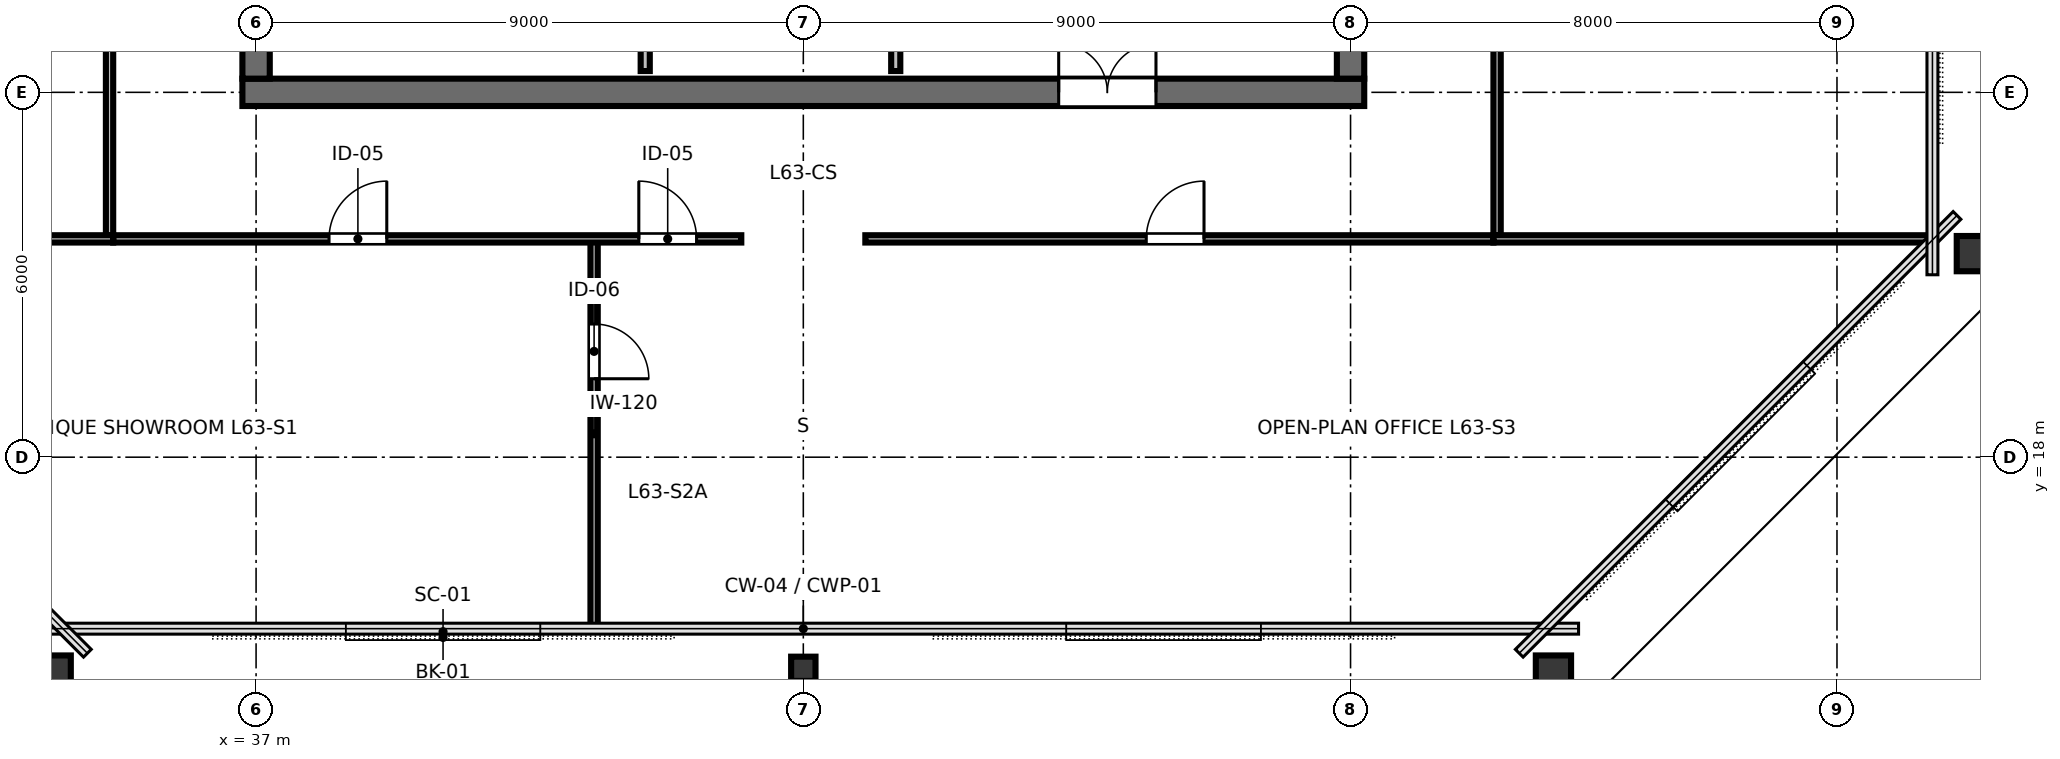
"""IFC4 building model, lengths in metres.
Left out: names, types, materials, properties, quantities, classifications, styles, units other than length and angle.
Written with IfcOpenShell. Run it as: python <this file> out.ifc"""

import sys

from ifc_helpers import new_model, si_unit, direction, frame, frame_2d, origin, origin_2d, place, context, subcontext, project, spatial, rectangle, hollow_rectangle, i_section, extrude, element, fill, save


model = new_model("IFC4")
c1 = context("Model", 3, precision=1e-05, world=origin(), true_north=direction((0.0, 1.0)))
c2 = subcontext(c1, "Body", "Model", "MODEL_VIEW")
j1 = project(units=[si_unit("LENGTHUNIT", "METRE"), si_unit("PLANEANGLEUNIT", "RADIAN")], contexts=[c1])
p1 = place(None, origin())
s1 = spatial("IfcSite", under=j1, at=p1, CompositionType="ELEMENT")
p2 = place(p1, origin())
s2 = spatial("IfcBuilding", under=s1, at=p2, CompositionType="ELEMENT")
p3 = place(p2, frame((0.0, 0.0, 239.4)))
s3 = spatial("IfcBuildingStorey", under=s2, at=p3, CompositionType="ELEMENT", Elevation=239.4)
p4 = place(p3, frame((36.775, 24.0, 0.0), z_axis=(0.0, 0.0, 1.0), x_axis=(1.0, 0.0, 0.0)))
e1 = element("IfcWall", 1, at=p4, inside=s3, PredefinedType="SHEAR", context=c2, shape_type="SweptSolid", body=[
    extrude(rectangle(XDim=18.45, YDim=0.45, at=frame_2d((9.225, 0.0))), origin(), (0.0, 0.0, 1.0), 3.36),
])
p5 = place(p4, frame((13.425, 0.0, 0.0)))
e2 = element("IfcOpeningElement", 2, at=p5, cuts=e1, PredefinedType="OPENING", context=c2, shape_type="SweptSolid", body=[
    extrude(rectangle(XDim=1.6, YDim=2.15, at=frame_2d((0.8, 1.075))), frame((0.0, 0.235, 0.0), z_axis=(0.0, -1.0, 0.0), x_axis=(1.0, 0.0, 0.0)), (0.0, 0.0, 1.0), 0.47),
])
p6 = place(p3, frame((37.0, 24.225, 0.0), z_axis=(0.0, 0.0, 1.0), x_axis=(0.0, 1.0, 0.0)))
e3 = element("IfcWall", 3, at=p6, inside=s3, PredefinedType="SHEAR", context=c2, shape_type="SweptSolid", body=[
    extrude(rectangle(XDim=15.55, YDim=0.45, at=frame_2d((7.775, 0.0))), origin(), (0.0, 0.0, 1.0), 3.36),
])
p7 = place(p6, frame((5.3, 0.0, 0.0)))
e4 = element("IfcOpeningElement", 4, at=p7, cuts=e3, PredefinedType="OPENING", context=c2, shape_type="SweptSolid", body=[
    extrude(rectangle(XDim=1.15, YDim=2.15, at=frame_2d((0.575, 1.075))), frame((0.0, 0.235, 0.0), z_axis=(0.0, -1.0, 0.0), x_axis=(1.0, 0.0, 0.0)), (0.0, 0.0, 1.0), 0.47),
])
p8 = place(p3, frame((55.0, 24.225, 0.0), z_axis=(0.0, 0.0, 1.0), x_axis=(0.0, 1.0, 0.0)))
e5 = element("IfcWall", 5, at=p8, inside=s3, PredefinedType="SHEAR", context=c2, shape_type="SweptSolid", body=[
    extrude(rectangle(XDim=15.55, YDim=0.45, at=frame_2d((7.775, 0.0))), origin(), (0.0, 0.0, 1.0), 3.36),
])
p9 = place(p8, frame((5.3, 0.0, 0.0)))
e6 = element("IfcOpeningElement", 6, at=p9, cuts=e5, PredefinedType="OPENING", context=c2, shape_type="SweptSolid", body=[
    extrude(rectangle(XDim=1.15, YDim=2.15, at=frame_2d((0.575, 1.075))), frame((0.0, 0.235, 0.0), z_axis=(0.0, -1.0, 0.0), x_axis=(1.0, 0.0, 0.0)), (0.0, 0.0, 1.0), 0.47),
])
p10 = place(p3, frame((33.663, 14.39, 0.0), z_axis=(0.0, 0.0, 1.0), x_axis=(1.0, 0.0, 0.0)))
e7 = element("IfcColumn", 7, at=p10, inside=s3, PredefinedType="COLUMN", context=c2, shape_type="SweptSolid", body=[
    extrude(hollow_rectangle(XDim=0.58, YDim=0.7, WallThickness=0.032, at=origin_2d()), origin(), (0.0, 0.0, 1.0), 3.373),
])
p11 = place(p3, frame((46.0, 14.52, 0.0), z_axis=(0.0, 0.0, 1.0), x_axis=(1.0, 0.0, 0.0)))
e8 = element("IfcColumn", 8, at=p11, inside=s3, PredefinedType="COLUMN", context=c2, shape_type="SweptSolid", body=[
    extrude(i_section(OverallWidth=0.401, OverallDepth=0.399, WebThickness=0.025, FlangeThickness=0.04, FilletRadius=0.025, at=origin_2d()), origin(), (0.0, 0.0, 1.0), 3.373),
])
for number, where, z_axis, x_axis in (
    (9, (58.337, 14.39, 0.0), (0.0, 0.0, 1.0), (1.0, 0.0, 0.0)),
    (10, (65.32, 21.348, 0.0), (0.0, 0.0, 1.0), (0.0, 1.0, 0.0)),
):
    element("IfcColumn", number, at=place(p3, frame(where, z_axis=z_axis, x_axis=x_axis)), inside=s3, PredefinedType="COLUMN", context=c2, shape_type="SweptSolid", body=[
        extrude(hollow_rectangle(XDim=0.58, YDim=0.7, WallThickness=0.032, at=origin_2d()), origin(), (0.0, 0.0, 1.0), 3.373),
    ])
p12 = place(p3, frame((43.4, 24.35, 0.0), z_axis=(0.0, 0.0, 1.0), x_axis=(0.0, 1.0, 0.0)))
e11 = element("IfcWall", 11, at=p12, inside=s3, PredefinedType="PARTITIONING", context=c2, shape_type="SweptSolid", body=[
    extrude(rectangle(XDim=3.9, YDim=0.15, at=frame_2d((1.95, 0.0))), origin(), (0.0, 0.0, 1.0), 3.375),
])
p13 = place(p12, frame((1.5, 0.0, 0.0)))
e12 = element("IfcOpeningElement", 12, at=p13, cuts=e11, PredefinedType="OPENING", context=c2, shape_type="SweptSolid", body=[
    extrude(rectangle(XDim=0.9, YDim=2.15, at=frame_2d((0.45, 1.075))), frame((0.0, 0.085, 0.0), z_axis=(0.0, -1.0, 0.0), x_axis=(1.0, 0.0, 0.0)), (0.0, 0.0, 1.0), 0.17),
])
p14 = place(p3, frame((47.52, 24.35, 0.0), z_axis=(0.0, 0.0, 1.0), x_axis=(0.0, 1.0, 0.0)))
e13 = element("IfcWall", 13, at=p14, inside=s3, PredefinedType="PARTITIONING", context=c2, shape_type="SweptSolid", body=[
    extrude(rectangle(XDim=3.9, YDim=0.15, at=frame_2d((1.95, 0.0))), origin(), (0.0, 0.0, 1.0), 3.375),
])
p15 = place(p14, frame((0.35, 0.0, 0.0)))
e14 = element("IfcOpeningElement", 14, at=p15, cuts=e13, PredefinedType="OPENING", context=c2, shape_type="SweptSolid", body=[
    extrude(rectangle(XDim=0.9, YDim=2.15, at=frame_2d((0.45, 1.075))), frame((0.0, 0.085, 0.0), z_axis=(0.0, -1.0, 0.0), x_axis=(1.0, 0.0, 0.0)), (0.0, 0.0, 1.0), 0.17),
])
p16 = place(p3, frame((42.559, 21.59, 0.0), z_axis=(0.0, 0.0, 1.0), x_axis=(0.0, -1.0, 0.0)))
e15 = element("IfcWall", 15, at=p16, inside=s3, PredefinedType="PARTITIONING", context=c2, shape_type="SweptSolid", body=[
    extrude(rectangle(XDim=6.41, YDim=0.12, at=frame_2d((3.205, 0.0))), origin(), (0.0, 0.0, 1.0), 2.655),
])
p17 = place(p16, frame((1.4, 0.0, 0.0)))
e16 = element("IfcOpeningElement", 16, at=p17, cuts=e15, PredefinedType="OPENING", context=c2, shape_type="SweptSolid", body=[
    extrude(rectangle(XDim=0.9, YDim=2.15, at=frame_2d((0.45, 1.075))), frame((0.0, 0.07, 0.0), z_axis=(0.0, -1.0, 0.0), x_axis=(1.0, 0.0, 0.0)), (0.0, 0.0, 1.0), 0.14),
])
p18 = place(p3, frame((34.65, 21.59, 0.0), z_axis=(0.0, 0.0, 1.0), x_axis=(1.0, 0.0, 0.0)))
e17 = element("IfcWall", 17, at=p18, inside=s3, PredefinedType="PARTITIONING", context=c2, shape_type="SweptSolid", body=[
    extrude(rectangle(XDim=10.33, YDim=0.12, at=frame_2d((5.165, 0.0))), origin(), (0.0, 0.0, 1.0), 2.655),
])
p19 = place(p18, frame((3.55, 0.0, 0.0)))
e18 = element("IfcOpeningElement", 18, at=p19, cuts=e17, PredefinedType="OPENING", context=c2, shape_type="SweptSolid", body=[
    extrude(rectangle(XDim=0.95, YDim=2.15, at=frame_2d((0.475, 1.075))), frame((0.0, 0.07, 0.0), z_axis=(0.0, -1.0, 0.0), x_axis=(1.0, 0.0, 0.0)), (0.0, 0.0, 1.0), 0.14),
])
p20 = place(p18, frame((8.645, 0.0, 0.0)))
e19 = element("IfcOpeningElement", 19, at=p20, cuts=e17, PredefinedType="OPENING", context=c2, shape_type="SweptSolid", body=[
    extrude(rectangle(XDim=0.95, YDim=2.15, at=frame_2d((0.475, 1.075))), frame((0.0, 0.07, 0.0), z_axis=(0.0, -1.0, 0.0), x_axis=(1.0, 0.0, 0.0)), (0.0, 0.0, 1.0), 0.14),
])
p21 = place(p3, frame((47.02, 21.59, 0.0), z_axis=(0.0, 0.0, 1.0), x_axis=(1.0, 0.0, 0.0)))
e20 = element("IfcWall", 20, at=p21, inside=s3, PredefinedType="PARTITIONING", context=c2, shape_type="SweptSolid", body=[
    extrude(rectangle(XDim=10.33, YDim=0.12, at=frame_2d((5.165, 0.0))), origin(), (0.0, 0.0, 1.0), 2.655),
])
p22 = place(p21, frame((4.62, 0.0, 0.0)))
e21 = element("IfcOpeningElement", 21, at=p22, cuts=e20, PredefinedType="OPENING", context=c2, shape_type="SweptSolid", body=[
    extrude(rectangle(XDim=0.95, YDim=2.15, at=frame_2d((0.475, 1.075))), frame((0.0, 0.07, 0.0), z_axis=(0.0, -1.0, 0.0), x_axis=(1.0, 0.0, 0.0)), (0.0, 0.0, 1.0), 0.14),
])
p23 = place(p3, frame((34.59, 21.65, 0.0), z_axis=(0.0, 0.0, 1.0), x_axis=(0.0, 1.0, 0.0)))
e22 = element("IfcWall", 22, at=p23, inside=s3, PredefinedType="PARTITIONING", context=c2, shape_type="SweptSolid", body=[
    extrude(rectangle(XDim=20.7, YDim=0.12, at=frame_2d((10.35, 0.0))), origin(), (0.0, 0.0, 1.0), 2.655),
])
p24 = place(p23, frame((4.26, 0.0, 0.0)))
e23 = element("IfcOpeningElement", 23, at=p24, cuts=e22, PredefinedType="OPENING", context=c2, shape_type="SweptSolid", body=[
    extrude(rectangle(XDim=0.95, YDim=2.15, at=frame_2d((0.475, 1.075))), frame((0.0, 0.07, 0.0), z_axis=(0.0, -1.0, 0.0), x_axis=(1.0, 0.0, 0.0)), (0.0, 0.0, 1.0), 0.14),
])
p25 = place(p23, frame((14.411, 0.0, 0.0)))
e24 = element("IfcOpeningElement", 24, at=p25, cuts=e22, PredefinedType="OPENING", context=c2, shape_type="SweptSolid", body=[
    extrude(rectangle(XDim=0.95, YDim=2.15, at=frame_2d((0.475, 1.075))), frame((0.0, 0.07, 0.0), z_axis=(0.0, -1.0, 0.0), x_axis=(1.0, 0.0, 0.0)), (0.0, 0.0, 1.0), 0.14),
])
p26 = place(p3, frame((57.41, 21.65, 0.0), z_axis=(0.0, 0.0, 1.0), x_axis=(0.0, 1.0, 0.0)))
e25 = element("IfcWall", 25, at=p26, inside=s3, PredefinedType="PARTITIONING", context=c2, shape_type="SweptSolid", body=[
    extrude(rectangle(XDim=20.7, YDim=0.12, at=frame_2d((10.35, 0.0))), origin(), (0.0, 0.0, 1.0), 2.655),
])
p27 = place(p26, frame((9.875, 0.0, 0.0)))
e26 = element("IfcOpeningElement", 26, at=p27, cuts=e25, PredefinedType="OPENING", context=c2, shape_type="SweptSolid", body=[
    extrude(rectangle(XDim=0.95, YDim=2.15, at=frame_2d((0.475, 1.075))), frame((0.0, 0.07, 0.0), z_axis=(0.0, -1.0, 0.0), x_axis=(1.0, 0.0, 0.0)), (0.0, 0.0, 1.0), 0.14),
])
for number, where, z_axis, x_axis in (
    (27, (34.65, 21.59, 0.0), (0.0, 0.0, 1.0), (-1.0, 0.0, 0.0)),
    (28, (57.35, 21.59, 0.0), (0.0, 0.0, 1.0), (1.0, 0.0, 0.0)),
):
    element("IfcWall", number, at=place(p3, frame(where, z_axis=z_axis, x_axis=x_axis)), inside=s3, PredefinedType="PARTITIONING", context=c2, shape_type="SweptSolid", body=[
        extrude(rectangle(XDim=7.22, YDim=0.12, at=frame_2d((3.61, 0.0))), origin(), (0.0, 0.0, 1.0), 2.655),
    ])
p28 = place(p5, origin())
e29 = element("IfcDoor", 29, at=p28, inside=s3, OperationType="DOUBLE_DOOR_SINGLE_SWING", PredefinedType="DOOR", context=c2, shape_type="SweptSolid", body=[
    extrude(rectangle(XDim=1.6, YDim=2.15, at=frame_2d((0.8, 1.075))), frame((0.0, 0.025, 0.0), z_axis=(0.0, -1.0, 0.0), x_axis=(1.0, 0.0, 0.0)), (0.0, 0.0, 1.0), 0.05),
])
fill(e2, e29)
p29 = place(p17, origin())
e30 = element("IfcDoor", 30, at=p29, inside=s3, OperationType="SINGLE_SWING_RIGHT", PredefinedType="DOOR", context=c2, shape_type="SweptSolid", body=[
    extrude(rectangle(XDim=0.9, YDim=2.15, at=frame_2d((0.45, 1.075))), frame((0.0, 0.025, 0.0), z_axis=(0.0, -1.0, 0.0), x_axis=(1.0, 0.0, 0.0)), (0.0, 0.0, 1.0), 0.05),
])
fill(e16, e30)
p30 = place(p19, origin())
e31 = element("IfcDoor", 31, at=p30, inside=s3, OperationType="SINGLE_SWING_RIGHT", PredefinedType="DOOR", context=c2, shape_type="SweptSolid", body=[
    extrude(rectangle(XDim=0.95, YDim=2.15, at=frame_2d((0.475, 1.075))), frame((0.0, 0.025, 0.0), z_axis=(0.0, -1.0, 0.0), x_axis=(1.0, 0.0, 0.0)), (0.0, 0.0, 1.0), 0.05),
])
fill(e18, e31)
p31 = place(p20, origin())
e32 = element("IfcDoor", 32, at=p31, inside=s3, OperationType="SINGLE_SWING_LEFT", PredefinedType="DOOR", context=c2, shape_type="SweptSolid", body=[
    extrude(rectangle(XDim=0.95, YDim=2.15, at=frame_2d((0.475, 1.075))), frame((0.0, 0.025, 0.0), z_axis=(0.0, -1.0, 0.0), x_axis=(1.0, 0.0, 0.0)), (0.0, 0.0, 1.0), 0.05),
])
fill(e19, e32)
p32 = place(p22, origin())
e33 = element("IfcDoor", 33, at=p32, inside=s3, OperationType="SINGLE_SWING_RIGHT", PredefinedType="DOOR", context=c2, shape_type="SweptSolid", body=[
    extrude(rectangle(XDim=0.95, YDim=2.15, at=frame_2d((0.475, 1.075))), frame((0.0, 0.025, 0.0), z_axis=(0.0, -1.0, 0.0), x_axis=(1.0, 0.0, 0.0)), (0.0, 0.0, 1.0), 0.05),
])
fill(e21, e33)
save(model, sys.argv[1])
